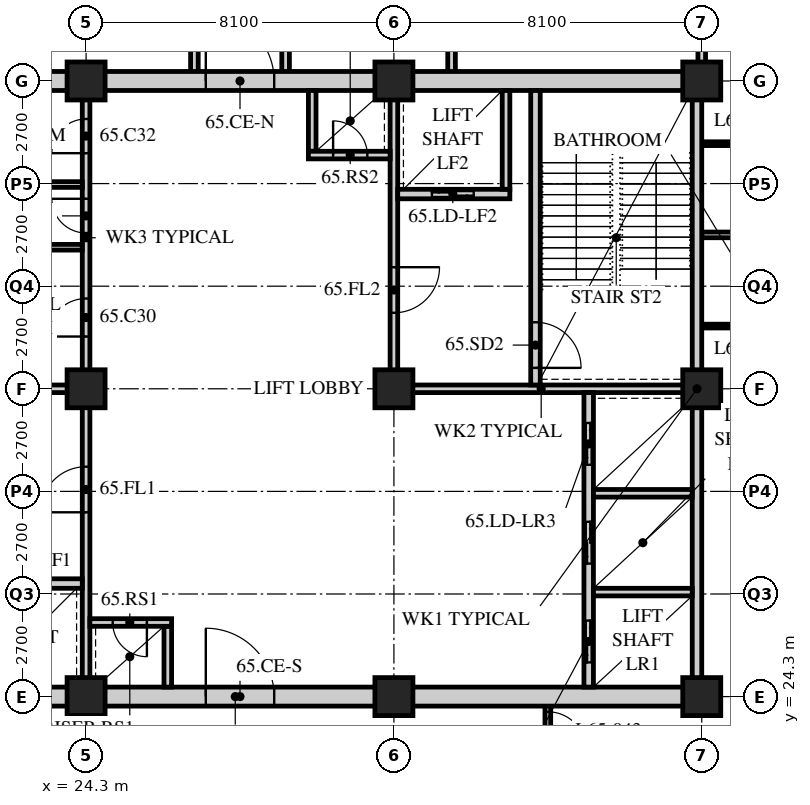
"""IFC4 building model, lengths in metres.
Left out: names, types, materials, properties, quantities, classifications, styles, units other than length and angle.
Written with IfcOpenShell. Run it as: python <this file> out.ifc"""

import sys

from ifc_helpers import new_model, si_unit, direction, frame, frame_2d, origin, origin_2d, place, context, subcontext, project, spatial, rectangle, hollow_rectangle, extrude, element, fill, save


model = new_model("IFC4")
c1 = context("Model", 3, precision=1e-05, world=origin(), true_north=direction((0.0, 1.0)))
c2 = subcontext(c1, "Body", "Model", "MODEL_VIEW")
j1 = project(units=[si_unit("LENGTHUNIT", "METRE"), si_unit("PLANEANGLEUNIT", "RADIAN")], contexts=[c1])
p1 = place(None, origin())
s1 = spatial("IfcSite", under=j1, at=p1, CompositionType="ELEMENT")
p2 = place(p1, origin())
s2 = spatial("IfcBuilding", under=s1, at=p2, CompositionType="ELEMENT")
p3 = place(p2, frame((0.0, 0.0, 254.1)))
s3 = spatial("IfcBuildingStorey", under=s2, at=p3, CompositionType="ELEMENT", Elevation=254.1)
for number, where, z_axis, x_axis in (
    (1, (24.3, 24.3, 0.0), (0.0, 0.0, 1.0), (1.0, 0.0, 0.0)),
    (2, (24.3, 32.4, 0.0), (0.0, 0.0, 1.0), (1.0, 0.0, 0.0)),
    (3, (24.3, 40.5, 0.0), (0.0, 0.0, 1.0), (1.0, 0.0, 0.0)),
    (4, (32.4, 24.3, 0.0), (0.0, 0.0, 1.0), (1.0, 0.0, 0.0)),
    (5, (32.4, 32.4, 0.0), (0.0, 0.0, 1.0), (1.0, 0.0, 0.0)),
    (6, (32.4, 40.5, 0.0), (0.0, 0.0, 1.0), (1.0, 0.0, 0.0)),
    (7, (40.5, 24.3, 0.0), (0.0, 0.0, 1.0), (1.0, 0.0, 0.0)),
    (8, (40.5, 32.4, 0.0), (0.0, 0.0, 1.0), (1.0, 0.0, 0.0)),
    (9, (40.5, 40.5, 0.0), (0.0, 0.0, 1.0), (1.0, 0.0, 0.0)),
):
    element("IfcColumn", number, at=place(p3, frame(where, z_axis=z_axis, x_axis=x_axis)), inside=s3, PredefinedType="COLUMN", context=c2, shape_type="SweptSolid", body=[
        extrude(hollow_rectangle(XDim=1.0, YDim=1.0, WallThickness=0.1, at=origin_2d()), origin(), (0.0, 0.0, 1.0), 3.9),
    ])
for number, where, z_axis, x_axis in (
    (10, (33.917, 50.85, 0.0), (0.0, 0.0, 1.0), (0.0, -1.0, 0.0)),
    (11, (27.15, 40.5, 0.0), (0.0, 0.0, 1.0), (0.0, 1.0, 0.0)),
    (12, (29.55, 40.5, 0.0), (0.0, 0.0, 1.0), (0.0, 1.0, 0.0)),
):
    element("IfcWall", number, at=place(p3, frame(where, z_axis=z_axis, x_axis=x_axis)), inside=s3, PredefinedType="SOLIDWALL", context=c2, shape_type="SweptSolid", body=[
        extrude(rectangle(XDim=10.35, YDim=0.2, at=frame_2d((5.175, 0.0))), origin(), (0.0, 0.0, 1.0), 3.69),
    ])
p4 = place(p3, frame((36.45, 22.5, 0.0), z_axis=(0.0, 0.0, 1.0), x_axis=(0.0, 1.0, 0.0)))
e13 = element("IfcWall", 13, at=p4, inside=s3, PredefinedType="PARTITIONING", context=c2, shape_type="SweptSolid", body=[
    extrude(rectangle(XDim=1.8, YDim=0.15, at=frame_2d((0.9, 0.0))), origin(), (0.0, 0.0, 1.0), 3.69),
])
p5 = place(p4, frame((0.4, 0.0, 0.0)))
e14 = element("IfcOpeningElement", 14, at=p5, cuts=e13, PredefinedType="OPENING", context=c2, shape_type="SweptSolid", body=[
    extrude(rectangle(XDim=1.0, YDim=2.1, at=frame_2d((0.5, 1.05))), frame((0.0, 0.085, 0.0), z_axis=(0.0, -1.0, 0.0), x_axis=(1.0, 0.0, 0.0)), (0.0, 0.0, 1.0), 0.17),
])
p6 = place(p3, frame((40.5, 40.5, 0.0), z_axis=(0.0, 0.0, 1.0), x_axis=(0.0, 1.0, 0.0)))
e15 = element("IfcWall", 15, at=p6, inside=s3, PredefinedType="SOLIDWALL", context=c2, shape_type="SweptSolid", body=[
    extrude(rectangle(XDim=10.35, YDim=0.2, at=frame_2d((5.175, 0.0))), origin(), (0.0, 0.0, 1.0), 3.078),
])
p7 = place(p3, frame((40.5, 34.05, 0.0), z_axis=(0.0, 0.0, 1.0), x_axis=(1.0, 0.0, 0.0)))
e16 = element("IfcWall", 16, at=p7, inside=s3, PredefinedType="PARTITIONING", context=c2, shape_type="SweptSolid", body=[
    extrude(rectangle(XDim=2.4, YDim=0.1, at=frame_2d((1.2, 0.0))), origin(), (0.0, 0.0, 1.0), 3.69),
])
p8 = place(p7, frame((0.8, 0.0, 0.0)))
e17 = element("IfcOpeningElement", 17, at=p8, cuts=e16, PredefinedType="OPENING", context=c2, shape_type="SweptSolid", body=[
    extrude(rectangle(XDim=0.8, YDim=2.1, at=frame_2d((0.4, 1.05))), frame((0.0, 0.06, 0.0), z_axis=(0.0, -1.0, 0.0), x_axis=(1.0, 0.0, 0.0)), (0.0, 0.0, 1.0), 0.12),
])
p9 = place(p3, frame((40.5, 36.45, 0.0), z_axis=(0.0, 0.0, 1.0), x_axis=(1.0, 0.0, 0.0)))
e18 = element("IfcWall", 18, at=p9, inside=s3, PredefinedType="PARTITIONING", context=c2, shape_type="SweptSolid", body=[
    extrude(rectangle(XDim=15.9, YDim=0.15, at=frame_2d((7.95, 0.0))), origin(), (0.0, 0.0, 1.0), 3.69),
])
p10 = place(p3, frame((40.5, 38.85, 0.0), z_axis=(0.0, 0.0, 1.0), x_axis=(1.0, 0.0, 0.0)))
e19 = element("IfcWall", 19, at=p10, inside=s3, PredefinedType="PARTITIONING", context=c2, shape_type="SweptSolid", body=[
    extrude(rectangle(XDim=2.4, YDim=0.1, at=frame_2d((1.2, 0.0))), origin(), (0.0, 0.0, 1.0), 3.69),
])
p11 = place(p10, frame((0.8, 0.0, 0.0)))
e20 = element("IfcOpeningElement", 20, at=p11, cuts=e19, PredefinedType="OPENING", context=c2, shape_type="SweptSolid", body=[
    extrude(rectangle(XDim=0.8, YDim=2.1, at=frame_2d((0.4, 1.05))), frame((0.0, 0.06, 0.0), z_axis=(0.0, -1.0, 0.0), x_axis=(1.0, 0.0, 0.0)), (0.0, 0.0, 1.0), 0.12),
])
p12 = place(p3, frame((15.95, 24.3, 0.0), z_axis=(0.0, 0.0, 1.0), x_axis=(1.0, 0.0, 0.0)))
e21 = element("IfcWall", 21, at=p12, inside=s3, PredefinedType="SOLIDWALL", context=c2, shape_type="SweptSolid", body=[
    extrude(rectangle(XDim=24.55, YDim=0.5, at=frame_2d((12.275, 0.0))), origin(), (0.0, 0.0, 1.0), 3.04),
])
p13 = place(p12, frame((11.5, 0.0, 0.0)))
e22 = element("IfcOpeningElement", 22, at=p13, cuts=e21, PredefinedType="OPENING", context=c2, shape_type="SweptSolid", body=[
    extrude(rectangle(XDim=1.8, YDim=2.4, at=frame_2d((0.9, 1.2))), frame((0.0, 0.26, 0.0), z_axis=(0.0, -1.0, 0.0), x_axis=(1.0, 0.0, 0.0)), (0.0, 0.0, 1.0), 0.52),
])
p14 = place(p3, frame((15.95, 40.5, 0.0), z_axis=(0.0, 0.0, 1.0), x_axis=(1.0, 0.0, 0.0)))
e23 = element("IfcWall", 23, at=p14, inside=s3, PredefinedType="SOLIDWALL", context=c2, shape_type="SweptSolid", body=[
    extrude(rectangle(XDim=24.55, YDim=0.5, at=frame_2d((12.275, 0.0))), origin(), (0.0, 0.0, 1.0), 3.04),
])
p15 = place(p14, frame((11.5, 0.0, 0.0)))
e24 = element("IfcOpeningElement", 24, at=p15, cuts=e23, PredefinedType="OPENING", context=c2, shape_type="SweptSolid", body=[
    extrude(rectangle(XDim=1.8, YDim=2.4, at=frame_2d((0.9, 1.2))), frame((0.0, 0.26, 0.0), z_axis=(0.0, -1.0, 0.0), x_axis=(1.0, 0.0, 0.0)), (0.0, 0.0, 1.0), 0.52),
])
p16 = place(p3, frame((40.375, 24.55, 0.0), z_axis=(0.0, 0.0, 1.0), x_axis=(0.0, 1.0, 0.0)))
e25 = element("IfcWall", 25, at=p16, inside=s3, PredefinedType="SOLIDWALL", context=c2, shape_type="SweptSolid", body=[
    extrude(rectangle(XDim=15.7, YDim=0.25, at=frame_2d((7.85, 0.0))), origin(), (0.0, 0.0, 1.0), 3.078),
])
p17 = place(p3, frame((16.45, 32.4, 0.0), z_axis=(0.0, 0.0, 1.0), x_axis=(1.0, 0.0, 0.0)))
e26 = element("IfcWall", 26, at=p17, inside=s3, PredefinedType="SOLIDWALL", context=c2, shape_type="SweptSolid", body=[
    extrude(rectangle(XDim=7.95, YDim=0.2, at=frame_2d((3.975, 0.0))), origin(), (0.0, 0.0, 1.0), 3.078),
])
p18 = place(p3, frame((24.3, 24.55, 0.0), z_axis=(0.0, 0.0, 1.0), x_axis=(0.0, 1.0, 0.0)))
e27 = element("IfcWall", 27, at=p18, inside=s3, PredefinedType="SOLIDWALL", context=c2, shape_type="SweptSolid", body=[
    extrude(rectangle(XDim=7.75, YDim=0.2, at=frame_2d((3.875, 0.0))), origin(), (0.0, 0.0, 1.0), 3.078),
])
p19 = place(p18, frame((4.6, 0.0, 0.0)))
e28 = element("IfcOpeningElement", 28, at=p19, cuts=e27, PredefinedType="OPENING", context=c2, shape_type="SweptSolid", body=[
    extrude(rectangle(XDim=1.2, YDim=2.1, at=frame_2d((0.6, 1.05))), frame((0.0, 0.11, 0.0), z_axis=(0.0, -1.0, 0.0), x_axis=(1.0, 0.0, 0.0)), (0.0, 0.0, 1.0), 0.22),
])
p20 = place(p3, frame((21.25, 27.275, 0.0), z_axis=(0.0, 0.0, 1.0), x_axis=(1.0, 0.0, 0.0)))
e29 = element("IfcWall", 29, at=p20, inside=s3, PredefinedType="SOLIDWALL", context=c2, shape_type="SweptSolid", body=[
    extrude(rectangle(XDim=2.95, YDim=0.25, at=frame_2d((1.475, 0.0))), origin(), (0.0, 0.0, 1.0), 3.69),
])
p21 = place(p20, frame((0.95, 0.0, 0.0)))
e30 = element("IfcOpeningElement", 30, at=p21, cuts=e29, PredefinedType="OPENING", context=c2, shape_type="SweptSolid", body=[
    extrude(rectangle(XDim=1.1, YDim=2.4, at=frame_2d((0.55, 1.2))), frame((0.0, 0.135, 0.0), z_axis=(0.0, -1.0, 0.0), x_axis=(1.0, 0.0, 0.0)), (0.0, 0.0, 1.0), 0.27),
])
p22 = place(p3, frame((26.45, 24.55, 0.0), z_axis=(0.0, 0.0, 1.0), x_axis=(0.0, 1.0, 0.0)))
e31 = element("IfcWall", 31, at=p22, inside=s3, PredefinedType="SOLIDWALL", context=c2, shape_type="SweptSolid", body=[
    extrude(rectangle(XDim=1.6, YDim=0.2, at=frame_2d((0.8, 0.0))), origin(), (0.0, 0.0, 1.0), 3.69),
])
p23 = place(p3, frame((24.4, 26.25, 0.0), z_axis=(0.0, 0.0, 1.0), x_axis=(1.0, 0.0, 0.0)))
e32 = element("IfcWall", 32, at=p23, inside=s3, PredefinedType="SOLIDWALL", context=c2, shape_type="SweptSolid", body=[
    extrude(rectangle(XDim=2.15, YDim=0.2, at=frame_2d((1.075, 0.0))), origin(), (0.0, 0.0, 1.0), 3.69),
])
p24 = place(p23, frame((0.6, 0.0, 0.0)))
e33 = element("IfcOpeningElement", 33, at=p24, cuts=e32, PredefinedType="OPENING", context=c2, shape_type="SweptSolid", body=[
    extrude(rectangle(XDim=0.9, YDim=2.1, at=frame_2d((0.45, 1.05))), frame((0.0, 0.11, 0.0), z_axis=(0.0, -1.0, 0.0), x_axis=(1.0, 0.0, 0.0)), (0.0, 0.0, 1.0), 0.22),
])
p25 = place(p3, frame((32.3, 32.4, 0.0), z_axis=(0.0, 0.0, 1.0), x_axis=(1.0, 0.0, 0.0)))
e34 = element("IfcWall", 34, at=p25, inside=s3, PredefinedType="SOLIDWALL", context=c2, shape_type="SweptSolid", body=[
    extrude(rectangle(XDim=7.95, YDim=0.2, at=frame_2d((3.975, 0.0))), origin(), (0.0, 0.0, 1.0), 3.078),
])
p26 = place(p3, frame((32.4, 32.5, 0.0), z_axis=(0.0, 0.0, 1.0), x_axis=(0.0, 1.0, 0.0)))
e35 = element("IfcWall", 35, at=p26, inside=s3, PredefinedType="SOLIDWALL", context=c2, shape_type="SweptSolid", body=[
    extrude(rectangle(XDim=7.75, YDim=0.2, at=frame_2d((3.875, 0.0))), origin(), (0.0, 0.0, 1.0), 3.078),
])
p27 = place(p26, frame((1.9, 0.0, 0.0)))
e36 = element("IfcOpeningElement", 36, at=p27, cuts=e35, PredefinedType="OPENING", context=c2, shape_type="SweptSolid", body=[
    extrude(rectangle(XDim=1.2, YDim=2.1, at=frame_2d((0.6, 1.05))), frame((0.0, 0.11, 0.0), z_axis=(0.0, -1.0, 0.0), x_axis=(1.0, 0.0, 0.0)), (0.0, 0.0, 1.0), 0.22),
])
p28 = place(p3, frame((37.525, 24.55, 0.0), z_axis=(0.0, 0.0, 1.0), x_axis=(0.0, 1.0, 0.0)))
e37 = element("IfcWall", 37, at=p28, inside=s3, PredefinedType="SOLIDWALL", context=c2, shape_type="SweptSolid", body=[
    extrude(rectangle(XDim=7.75, YDim=0.25, at=frame_2d((3.875, 0.0))), origin(), (0.0, 0.0, 1.0), 3.69),
])
p29 = place(p28, frame((0.65, 0.0, 0.0)))
e38 = element("IfcOpeningElement", 38, at=p29, cuts=e37, PredefinedType="OPENING", context=c2, shape_type="SweptSolid", body=[
    extrude(rectangle(XDim=1.1, YDim=2.4, at=frame_2d((0.55, 1.2))), frame((0.0, 0.135, 0.0), z_axis=(0.0, -1.0, 0.0), x_axis=(1.0, 0.0, 0.0)), (0.0, 0.0, 1.0), 0.27),
])
p30 = place(p28, frame((3.25, 0.0, 0.0)))
e39 = element("IfcOpeningElement", 39, at=p30, cuts=e37, PredefinedType="OPENING", context=c2, shape_type="SweptSolid", body=[
    extrude(rectangle(XDim=1.1, YDim=2.4, at=frame_2d((0.55, 1.2))), frame((0.0, 0.135, 0.0), z_axis=(0.0, -1.0, 0.0), x_axis=(1.0, 0.0, 0.0)), (0.0, 0.0, 1.0), 0.27),
])
p31 = place(p28, frame((5.85, 0.0, 0.0)))
e40 = element("IfcOpeningElement", 40, at=p31, cuts=e37, PredefinedType="OPENING", context=c2, shape_type="SweptSolid", body=[
    extrude(rectangle(XDim=1.1, YDim=2.4, at=frame_2d((0.55, 1.2))), frame((0.0, 0.135, 0.0), z_axis=(0.0, -1.0, 0.0), x_axis=(1.0, 0.0, 0.0)), (0.0, 0.0, 1.0), 0.27),
])
for number, where, z_axis, x_axis in (
    (41, (37.65, 27.05, 0.0), (0.0, 0.0, 1.0), (1.0, 0.0, 0.0)),
    (42, (37.65, 29.65, 0.0), (0.0, 0.0, 1.0), (1.0, 0.0, 0.0)),
):
    element("IfcWall", number, at=place(p3, frame(where, z_axis=z_axis, x_axis=x_axis)), inside=s3, PredefinedType="SOLIDWALL", context=c2, shape_type="SweptSolid", body=[
        extrude(rectangle(XDim=2.6, YDim=0.2, at=frame_2d((1.3, 0.0))), origin(), (0.0, 0.0, 1.0), 3.69),
    ])
p32 = place(p3, frame((36.125, 32.5, 0.0), z_axis=(0.0, 0.0, 1.0), x_axis=(0.0, 1.0, 0.0)))
e43 = element("IfcWall", 43, at=p32, inside=s3, PredefinedType="SOLIDWALL", context=c2, shape_type="SweptSolid", body=[
    extrude(rectangle(XDim=7.75, YDim=0.25, at=frame_2d((3.875, 0.0))), origin(), (0.0, 0.0, 1.0), 3.69),
])
p33 = place(p32, frame((0.45, 0.0, 0.0)))
e44 = element("IfcOpeningElement", 44, at=p33, cuts=e43, PredefinedType="OPENING", context=c2, shape_type="SweptSolid", body=[
    extrude(rectangle(XDim=1.2, YDim=2.1, at=frame_2d((0.6, 1.05))), frame((0.0, 0.135, 0.0), z_axis=(0.0, -1.0, 0.0), x_axis=(1.0, 0.0, 0.0)), (0.0, 0.0, 1.0), 0.27),
])
p34 = place(p3, frame((32.5, 37.525, 0.0), z_axis=(0.0, 0.0, 1.0), x_axis=(1.0, 0.0, 0.0)))
e45 = element("IfcWall", 45, at=p34, inside=s3, PredefinedType="SOLIDWALL", context=c2, shape_type="SweptSolid", body=[
    extrude(rectangle(XDim=2.95, YDim=0.25, at=frame_2d((1.475, 0.0))), origin(), (0.0, 0.0, 1.0), 3.69),
])
p35 = place(p34, frame((0.9, 0.0, 0.0)))
e46 = element("IfcOpeningElement", 46, at=p35, cuts=e45, PredefinedType="OPENING", context=c2, shape_type="SweptSolid", body=[
    extrude(rectangle(XDim=1.1, YDim=2.4, at=frame_2d((0.55, 1.2))), frame((0.0, 0.135, 0.0), z_axis=(0.0, -1.0, 0.0), x_axis=(1.0, 0.0, 0.0)), (0.0, 0.0, 1.0), 0.27),
])
p36 = place(p3, frame((35.35, 37.65, 0.0), z_axis=(0.0, 0.0, 1.0), x_axis=(0.0, 1.0, 0.0)))
e47 = element("IfcWall", 47, at=p36, inside=s3, PredefinedType="SOLIDWALL", context=c2, shape_type="SweptSolid", body=[
    extrude(rectangle(XDim=2.6, YDim=0.2, at=frame_2d((1.3, 0.0))), origin(), (0.0, 0.0, 1.0), 3.69),
])
p37 = place(p3, frame((30.25, 38.65, 0.0), z_axis=(0.0, 0.0, 1.0), x_axis=(0.0, 1.0, 0.0)))
e48 = element("IfcWall", 48, at=p37, inside=s3, PredefinedType="SOLIDWALL", context=c2, shape_type="SweptSolid", body=[
    extrude(rectangle(XDim=1.6, YDim=0.2, at=frame_2d((0.8, 0.0))), origin(), (0.0, 0.0, 1.0), 3.69),
])
p38 = place(p3, frame((30.15, 38.55, 0.0), z_axis=(0.0, 0.0, 1.0), x_axis=(1.0, 0.0, 0.0)))
e49 = element("IfcWall", 49, at=p38, inside=s3, PredefinedType="SOLIDWALL", context=c2, shape_type="SweptSolid", body=[
    extrude(rectangle(XDim=2.15, YDim=0.2, at=frame_2d((1.075, 0.0))), origin(), (0.0, 0.0, 1.0), 3.69),
])
p39 = place(p38, frame((0.65, 0.0, 0.0)))
e50 = element("IfcOpeningElement", 50, at=p39, cuts=e49, PredefinedType="OPENING", context=c2, shape_type="SweptSolid", body=[
    extrude(rectangle(XDim=0.9, YDim=2.1, at=frame_2d((0.45, 1.05))), frame((0.0, 0.11, 0.0), z_axis=(0.0, -1.0, 0.0), x_axis=(1.0, 0.0, 0.0)), (0.0, 0.0, 1.0), 0.22),
])
p40 = place(p3, frame((24.3, 32.5, 0.0), z_axis=(0.0, 0.0, 1.0), x_axis=(0.0, 1.0, 0.0)))
e51 = element("IfcWall", 51, at=p40, inside=s3, PredefinedType="PARTITIONING", context=c2, shape_type="SweptSolid", body=[
    extrude(rectangle(XDim=7.75, YDim=0.2, at=frame_2d((3.875, 0.0))), origin(), (0.0, 0.0, 1.0), 3.078),
])
p41 = place(p40, frame((1.275, 0.0, 0.0)))
e52 = element("IfcOpeningElement", 52, at=p41, cuts=e51, PredefinedType="OPENING", context=c2, shape_type="SweptSolid", body=[
    extrude(rectangle(XDim=1.0, YDim=2.1, at=frame_2d((0.5, 1.05))), frame((0.0, 0.11, 0.0), z_axis=(0.0, -1.0, 0.0), x_axis=(1.0, 0.0, 0.0)), (0.0, 0.0, 1.0), 0.22),
])
p42 = place(p40, frame((4.0, 0.0, 0.0)))
e53 = element("IfcOpeningElement", 53, at=p42, cuts=e51, PredefinedType="OPENING", context=c2, shape_type="SweptSolid", body=[
    extrude(rectangle(XDim=0.9, YDim=2.1, at=frame_2d((0.45, 1.05))), frame((0.0, 0.11, 0.0), z_axis=(0.0, -1.0, 0.0), x_axis=(1.0, 0.0, 0.0)), (0.0, 0.0, 1.0), 0.22),
])
p43 = place(p40, frame((6.1, 0.0, 0.0)))
e54 = element("IfcOpeningElement", 54, at=p43, cuts=e51, PredefinedType="OPENING", context=c2, shape_type="SweptSolid", body=[
    extrude(rectangle(XDim=0.9, YDim=2.1, at=frame_2d((0.45, 1.05))), frame((0.0, 0.11, 0.0), z_axis=(0.0, -1.0, 0.0), x_axis=(1.0, 0.0, 0.0)), (0.0, 0.0, 1.0), 0.22),
])
for number, where, z_axis, x_axis in (
    (55, (21.05, 36.125, 0.0), (0.0, 0.0, 1.0), (1.0, 0.0, 0.0)),
    (56, (21.05, 37.775, 0.0), (0.0, 0.0, 1.0), (1.0, 0.0, 0.0)),
):
    element("IfcWall", number, at=place(p3, frame(where, z_axis=z_axis, x_axis=x_axis)), inside=s3, PredefinedType="PARTITIONING", context=c2, shape_type="SweptSolid", body=[
        extrude(rectangle(XDim=3.15, YDim=0.15, at=frame_2d((1.575, 0.0))), origin(), (0.0, 0.0, 1.0), 3.69),
    ])
p44 = place(p5, origin())
e57 = element("IfcDoor", 57, at=p44, inside=s3, OperationType="SINGLE_SWING_RIGHT", PredefinedType="DOOR", context=c2, shape_type="SweptSolid", body=[
    extrude(rectangle(XDim=1.0, YDim=2.1, at=frame_2d((0.5, 1.05))), frame((0.0, 0.025, 0.0), z_axis=(0.0, -1.0, 0.0), x_axis=(1.0, 0.0, 0.0)), (0.0, 0.0, 1.0), 0.05),
])
fill(e14, e57)
p45 = place(p41, origin())
e58 = element("IfcDoor", 58, at=p45, inside=s3, OperationType="SINGLE_SWING_LEFT", PredefinedType="DOOR", context=c2, shape_type="SweptSolid", body=[
    extrude(rectangle(XDim=1.0, YDim=2.1, at=frame_2d((0.5, 1.05))), frame((0.0, 0.025, 0.0), z_axis=(0.0, -1.0, 0.0), x_axis=(1.0, 0.0, 0.0)), (0.0, 0.0, 1.0), 0.05),
])
fill(e52, e58)
p46 = place(p42, origin())
e59 = element("IfcDoor", 59, at=p46, inside=s3, OperationType="SINGLE_SWING_RIGHT", PredefinedType="DOOR", context=c2, shape_type="SweptSolid", body=[
    extrude(rectangle(XDim=0.9, YDim=2.1, at=frame_2d((0.45, 1.05))), frame((0.0, 0.025, 0.0), z_axis=(0.0, -1.0, 0.0), x_axis=(1.0, 0.0, 0.0)), (0.0, 0.0, 1.0), 0.05),
])
fill(e53, e59)
p47 = place(p43, origin())
e60 = element("IfcDoor", 60, at=p47, inside=s3, OperationType="SINGLE_SWING_LEFT", PredefinedType="DOOR", context=c2, shape_type="SweptSolid", body=[
    extrude(rectangle(XDim=0.9, YDim=2.1, at=frame_2d((0.45, 1.05))), frame((0.0, 0.025, 0.0), z_axis=(0.0, -1.0, 0.0), x_axis=(1.0, 0.0, 0.0)), (0.0, 0.0, 1.0), 0.05),
])
fill(e54, e60)
p48 = place(p19, origin())
e61 = element("IfcDoor", 61, at=p48, inside=s3, OperationType="SINGLE_SWING_LEFT", PredefinedType="DOOR", context=c2, shape_type="SweptSolid", body=[
    extrude(rectangle(XDim=1.2, YDim=2.1, at=frame_2d((0.6, 1.05))), frame((0.0, 0.025, 0.0), z_axis=(0.0, -1.0, 0.0), x_axis=(1.0, 0.0, 0.0)), (0.0, 0.0, 1.0), 0.05),
])
fill(e28, e61)
p49 = place(p24, origin())
e62 = element("IfcDoor", 62, at=p49, inside=s3, OperationType="SINGLE_SWING_LEFT", PredefinedType="DOOR", context=c2, shape_type="SweptSolid", body=[
    extrude(rectangle(XDim=0.9, YDim=2.1, at=frame_2d((0.45, 1.05))), frame((0.0, 0.025, 0.0), z_axis=(0.0, -1.0, 0.0), x_axis=(1.0, 0.0, 0.0)), (0.0, 0.0, 1.0), 0.05),
])
fill(e33, e62)
p50 = place(p33, origin())
e63 = element("IfcDoor", 63, at=p50, inside=s3, OperationType="SINGLE_SWING_RIGHT", PredefinedType="DOOR", context=c2, shape_type="SweptSolid", body=[
    extrude(rectangle(XDim=1.2, YDim=2.1, at=frame_2d((0.6, 1.05))), frame((0.0, 0.025, 0.0), z_axis=(0.0, -1.0, 0.0), x_axis=(1.0, 0.0, 0.0)), (0.0, 0.0, 1.0), 0.05),
])
fill(e44, e63)
p51 = place(p27, origin())
e64 = element("IfcDoor", 64, at=p51, inside=s3, OperationType="SINGLE_SWING_LEFT", PredefinedType="DOOR", context=c2, shape_type="SweptSolid", body=[
    extrude(rectangle(XDim=1.2, YDim=2.1, at=frame_2d((0.6, 1.05))), frame((0.0, 0.025, 0.0), z_axis=(0.0, -1.0, 0.0), x_axis=(1.0, 0.0, 0.0)), (0.0, 0.0, 1.0), 0.05),
])
fill(e36, e64)
p52 = place(p39, origin())
e65 = element("IfcDoor", 65, at=p52, inside=s3, OperationType="SINGLE_SWING_LEFT", PredefinedType="DOOR", context=c2, shape_type="SweptSolid", body=[
    extrude(rectangle(XDim=0.9, YDim=2.1, at=frame_2d((0.45, 1.05))), frame((0.0, 0.025, 0.0), z_axis=(0.0, -1.0, 0.0), x_axis=(1.0, 0.0, 0.0)), (0.0, 0.0, 1.0), 0.05),
])
fill(e50, e65)
p53 = place(p29, origin())
e66 = element("IfcDoor", 66, at=p53, inside=s3, OperationType="DOUBLE_DOOR_SLIDING", PredefinedType="DOOR", context=c2, shape_type="SweptSolid", body=[
    extrude(rectangle(XDim=1.1, YDim=2.4, at=frame_2d((0.55, 1.2))), frame((0.0, 0.025, 0.0), z_axis=(0.0, -1.0, 0.0), x_axis=(1.0, 0.0, 0.0)), (0.0, 0.0, 1.0), 0.05),
])
fill(e38, e66)
p54 = place(p30, origin())
e67 = element("IfcDoor", 67, at=p54, inside=s3, OperationType="DOUBLE_DOOR_SLIDING", PredefinedType="DOOR", context=c2, shape_type="SweptSolid", body=[
    extrude(rectangle(XDim=1.1, YDim=2.4, at=frame_2d((0.55, 1.2))), frame((0.0, 0.025, 0.0), z_axis=(0.0, -1.0, 0.0), x_axis=(1.0, 0.0, 0.0)), (0.0, 0.0, 1.0), 0.05),
])
fill(e39, e67)
p55 = place(p31, origin())
e68 = element("IfcDoor", 68, at=p55, inside=s3, OperationType="DOUBLE_DOOR_SLIDING", PredefinedType="DOOR", context=c2, shape_type="SweptSolid", body=[
    extrude(rectangle(XDim=1.1, YDim=2.4, at=frame_2d((0.55, 1.2))), frame((0.0, 0.025, 0.0), z_axis=(0.0, -1.0, 0.0), x_axis=(1.0, 0.0, 0.0)), (0.0, 0.0, 1.0), 0.05),
])
fill(e40, e68)
p56 = place(p35, origin())
e69 = element("IfcDoor", 69, at=p56, inside=s3, OperationType="DOUBLE_DOOR_SLIDING", PredefinedType="DOOR", context=c2, shape_type="SweptSolid", body=[
    extrude(rectangle(XDim=1.1, YDim=2.4, at=frame_2d((0.55, 1.2))), frame((0.0, 0.025, 0.0), z_axis=(0.0, -1.0, 0.0), x_axis=(1.0, 0.0, 0.0)), (0.0, 0.0, 1.0), 0.05),
])
fill(e46, e69)
p57 = place(p13, origin())
e70 = element("IfcDoor", 70, at=p57, inside=s3, OperationType="DOUBLE_DOOR_SINGLE_SWING", PredefinedType="DOOR", context=c2, shape_type="SweptSolid", body=[
    extrude(rectangle(XDim=1.8, YDim=2.4, at=frame_2d((0.9, 1.2))), frame((0.0, 0.025, 0.0), z_axis=(0.0, -1.0, 0.0), x_axis=(1.0, 0.0, 0.0)), (0.0, 0.0, 1.0), 0.05),
])
fill(e22, e70)
p58 = place(p15, origin())
e71 = element("IfcDoor", 71, at=p58, inside=s3, OperationType="DOUBLE_DOOR_SINGLE_SWING", PredefinedType="DOOR", context=c2, shape_type="SweptSolid", body=[
    extrude(rectangle(XDim=1.8, YDim=2.4, at=frame_2d((0.9, 1.2))), frame((0.0, 0.025, 0.0), z_axis=(0.0, -1.0, 0.0), x_axis=(1.0, 0.0, 0.0)), (0.0, 0.0, 1.0), 0.05),
])
fill(e24, e71)
save(model, sys.argv[1])
